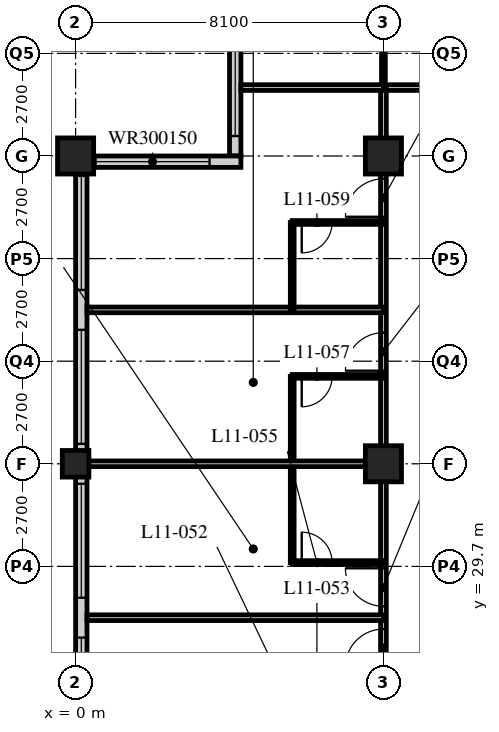
"""IFC4 building model, lengths in metres.
Left out: names, types, materials, properties, quantities, classifications, styles, units other than length and angle.
Written with IfcOpenShell. Run it as: python <this file> out.ifc"""

import sys

from ifc_helpers import new_model, si_unit, direction, frame, frame_2d, origin, origin_2d, place, context, subcontext, project, spatial, rectangle, hollow_rectangle, extrude, element, fill, save


model = new_model("IFC4")
c1 = context("Model", 3, precision=1e-05, world=origin(), true_north=direction((0.0, 1.0)))
c2 = subcontext(c1, "Body", "Model", "MODEL_VIEW")
j1 = project(units=[si_unit("LENGTHUNIT", "METRE"), si_unit("PLANEANGLEUNIT", "RADIAN")], contexts=[c1])
p1 = place(None, origin())
s1 = spatial("IfcSite", under=j1, at=p1, CompositionType="ELEMENT")
p2 = place(p1, origin())
s2 = spatial("IfcBuilding", under=s1, at=p2, CompositionType="ELEMENT")
p3 = place(p2, frame((0.0, 0.0, 50.0)))
s3 = spatial("IfcBuildingStorey", under=s2, at=p3, CompositionType="ELEMENT", Elevation=50.0)
p4 = place(p3, frame((0.0, 32.4, 0.0), z_axis=(0.0, 0.0, 1.0), x_axis=(1.0, 0.0, 0.0)))
e1 = element("IfcColumn", 1, at=p4, inside=s3, PredefinedType="COLUMN", context=c2, shape_type="SweptSolid", body=[
    extrude(hollow_rectangle(XDim=0.7, YDim=0.7, WallThickness=0.06, at=origin_2d()), origin(), (0.0, 0.0, 1.0), 3.4),
])
for number, where, z_axis, x_axis in (
    (2, (0.0, 40.5, 0.0), (0.0, 0.0, 1.0), (1.0, 0.0, 0.0)),
    (3, (8.1, 32.4, 0.0), (0.0, 0.0, 1.0), (1.0, 0.0, 0.0)),
    (4, (8.1, 40.5, 0.0), (0.0, 0.0, 1.0), (1.0, 0.0, 0.0)),
):
    element("IfcColumn", number, at=place(p3, frame(where, z_axis=z_axis, x_axis=x_axis)), inside=s3, PredefinedType="COLUMN", context=c2, shape_type="SweptSolid", body=[
        extrude(hollow_rectangle(XDim=0.95, YDim=0.95, WallThickness=0.095, at=origin_2d()), origin(), (0.0, 0.0, 1.0), 3.4),
    ])
p5 = place(p3, frame((4.2, 44.25, 0.0), z_axis=(0.0, 0.0, 1.0), x_axis=(0.0, -1.0, 0.0)))
e5 = element("IfcWall", 5, at=p5, inside=s3, PredefinedType="SOLIDWALL", context=c2, shape_type="SweptSolid", body=[
    extrude(rectangle(XDim=3.75, YDim=0.3, at=frame_2d((1.875, 0.0))), origin(), (0.0, 0.0, 1.0), 3.19),
])
p6 = place(p5, frame((0.225, 0.0, 0.9)))
e6 = element("IfcOpeningElement", 6, at=p6, cuts=e5, PredefinedType="OPENING", context=c2, shape_type="SweptSolid", body=[
    extrude(rectangle(XDim=3.0, YDim=1.5, at=frame_2d((1.5, 0.75))), frame((0.0, 0.16, 0.0), z_axis=(0.0, -1.0, 0.0), x_axis=(1.0, 0.0, 0.0)), (0.0, 0.0, 1.0), 0.32),
])
p7 = place(p3, frame((4.35, 40.35, 0.0), z_axis=(0.0, 0.0, 1.0), x_axis=(-1.0, 0.0, 0.0)))
e7 = element("IfcWall", 7, at=p7, inside=s3, PredefinedType="SOLIDWALL", context=c2, shape_type="SweptSolid", body=[
    extrude(rectangle(XDim=4.35, YDim=0.3, at=frame_2d((2.175, 0.0))), origin(), (0.0, 0.0, 1.0), 3.19),
])
p8 = place(p7, frame((0.825, 0.0, 0.9)))
e8 = element("IfcOpeningElement", 8, at=p8, cuts=e7, PredefinedType="OPENING", context=c2, shape_type="SweptSolid", body=[
    extrude(rectangle(XDim=3.0, YDim=1.5, at=frame_2d((1.5, 0.75))), frame((0.0, 0.16, 0.0), z_axis=(0.0, -1.0, 0.0), x_axis=(1.0, 0.0, 0.0)), (0.0, 0.0, 1.0), 0.32),
])
p9 = place(p3, frame((0.15, 40.2, 0.0), z_axis=(0.0, 0.0, 1.0), x_axis=(0.0, -1.0, 0.0)))
e9 = element("IfcWall", 9, at=p9, inside=s3, PredefinedType="SOLIDWALL", context=c2, shape_type="SweptSolid", body=[
    extrude(rectangle(XDim=32.1, YDim=0.3, at=frame_2d((16.05, 0.0))), origin(), (0.0, 0.0, 1.0), 3.19),
])
p10 = place(p9, frame((0.225, 0.0, 0.9)))
e10 = element("IfcOpeningElement", 10, at=p10, cuts=e9, PredefinedType="OPENING", context=c2, shape_type="SweptSolid", body=[
    extrude(rectangle(XDim=3.0, YDim=2.0, at=frame_2d((1.5, 1.0))), frame((0.0, 0.16, 0.0), z_axis=(0.0, -1.0, 0.0), x_axis=(1.0, 0.0, 0.0)), (0.0, 0.0, 1.0), 0.32),
])
p11 = place(p9, frame((4.275, 0.0, 0.9)))
e11 = element("IfcOpeningElement", 11, at=p11, cuts=e9, PredefinedType="OPENING", context=c2, shape_type="SweptSolid", body=[
    extrude(rectangle(XDim=3.0, YDim=2.0, at=frame_2d((1.5, 1.0))), frame((0.0, 0.16, 0.0), z_axis=(0.0, -1.0, 0.0), x_axis=(1.0, 0.0, 0.0)), (0.0, 0.0, 1.0), 0.32),
])
p12 = place(p9, frame((8.325, 0.0, 0.9)))
e12 = element("IfcOpeningElement", 12, at=p12, cuts=e9, PredefinedType="OPENING", context=c2, shape_type="SweptSolid", body=[
    extrude(rectangle(XDim=3.0, YDim=2.0, at=frame_2d((1.5, 1.0))), frame((0.0, 0.16, 0.0), z_axis=(0.0, -1.0, 0.0), x_axis=(1.0, 0.0, 0.0)), (0.0, 0.0, 1.0), 0.32),
])
p13 = place(p9, frame((12.375, 0.0, 0.9)))
e13 = element("IfcOpeningElement", 13, at=p13, cuts=e9, PredefinedType="OPENING", context=c2, shape_type="SweptSolid", body=[
    extrude(rectangle(XDim=3.0, YDim=2.0, at=frame_2d((1.5, 1.0))), frame((0.0, 0.16, 0.0), z_axis=(0.0, -1.0, 0.0), x_axis=(1.0, 0.0, 0.0)), (0.0, 0.0, 1.0), 0.32),
])
p14 = place(p9, frame((16.425, 0.0, 0.9)))
e14 = element("IfcOpeningElement", 14, at=p14, cuts=e9, PredefinedType="OPENING", context=c2, shape_type="SweptSolid", body=[
    extrude(rectangle(XDim=3.0, YDim=2.0, at=frame_2d((1.5, 1.0))), frame((0.0, 0.16, 0.0), z_axis=(0.0, -1.0, 0.0), x_axis=(1.0, 0.0, 0.0)), (0.0, 0.0, 1.0), 0.32),
])
p15 = place(p9, frame((20.475, 0.0, 0.9)))
e15 = element("IfcOpeningElement", 15, at=p15, cuts=e9, PredefinedType="OPENING", context=c2, shape_type="SweptSolid", body=[
    extrude(rectangle(XDim=3.0, YDim=2.0, at=frame_2d((1.5, 1.0))), frame((0.0, 0.16, 0.0), z_axis=(0.0, -1.0, 0.0), x_axis=(1.0, 0.0, 0.0)), (0.0, 0.0, 1.0), 0.32),
])
p16 = place(p9, frame((24.525, 0.0, 0.9)))
e16 = element("IfcOpeningElement", 16, at=p16, cuts=e9, PredefinedType="OPENING", context=c2, shape_type="SweptSolid", body=[
    extrude(rectangle(XDim=3.0, YDim=2.0, at=frame_2d((1.5, 1.0))), frame((0.0, 0.16, 0.0), z_axis=(0.0, -1.0, 0.0), x_axis=(1.0, 0.0, 0.0)), (0.0, 0.0, 1.0), 0.32),
])
p17 = place(p9, frame((28.575, 0.0, 0.9)))
e17 = element("IfcOpeningElement", 17, at=p17, cuts=e9, PredefinedType="OPENING", context=c2, shape_type="SweptSolid", body=[
    extrude(rectangle(XDim=3.0, YDim=2.0, at=frame_2d((1.5, 1.0))), frame((0.0, 0.16, 0.0), z_axis=(0.0, -1.0, 0.0), x_axis=(1.0, 0.0, 0.0)), (0.0, 0.0, 1.0), 0.32),
])
p18 = place(p3, frame((8.1, 42.3, 0.0), z_axis=(0.0, 0.0, 1.0), x_axis=(1.0, 0.0, 0.0)))
e18 = element("IfcWall", 18, at=p18, inside=s3, PredefinedType="PARTITIONING", context=c2, shape_type="SweptSolid", body=[
    extrude(rectangle(XDim=40.5, YDim=0.15, at=frame_2d((20.25, 0.0))), origin(), (0.0, 0.0, 1.0), 3.19),
])
p19 = place(p18, frame((6.5, 0.0, 0.0)))
e19 = element("IfcOpeningElement", 19, at=p19, cuts=e18, PredefinedType="OPENING", context=c2, shape_type="SweptSolid", body=[
    extrude(rectangle(XDim=1.0, YDim=2.1, at=frame_2d((0.5, 1.05))), frame((0.0, 0.085, 0.0), z_axis=(0.0, -1.0, 0.0), x_axis=(1.0, 0.0, 0.0)), (0.0, 0.0, 1.0), 0.17),
])
p20 = place(p18, frame((10.55, 0.0, 0.0)))
e20 = element("IfcOpeningElement", 20, at=p20, cuts=e18, PredefinedType="OPENING", context=c2, shape_type="SweptSolid", body=[
    extrude(rectangle(XDim=1.0, YDim=2.1, at=frame_2d((0.5, 1.05))), frame((0.0, 0.085, 0.0), z_axis=(0.0, -1.0, 0.0), x_axis=(1.0, 0.0, 0.0)), (0.0, 0.0, 1.0), 0.17),
])
p21 = place(p18, frame((14.6, 0.0, 0.0)))
e21 = element("IfcOpeningElement", 21, at=p21, cuts=e18, PredefinedType="OPENING", context=c2, shape_type="SweptSolid", body=[
    extrude(rectangle(XDim=1.0, YDim=2.1, at=frame_2d((0.5, 1.05))), frame((0.0, 0.085, 0.0), z_axis=(0.0, -1.0, 0.0), x_axis=(1.0, 0.0, 0.0)), (0.0, 0.0, 1.0), 0.17),
])
p22 = place(p18, frame((18.65, 0.0, 0.0)))
e22 = element("IfcOpeningElement", 22, at=p22, cuts=e18, PredefinedType="OPENING", context=c2, shape_type="SweptSolid", body=[
    extrude(rectangle(XDim=1.0, YDim=2.1, at=frame_2d((0.5, 1.05))), frame((0.0, 0.085, 0.0), z_axis=(0.0, -1.0, 0.0), x_axis=(1.0, 0.0, 0.0)), (0.0, 0.0, 1.0), 0.17),
])
p23 = place(p18, frame((22.7, 0.0, 0.0)))
e23 = element("IfcOpeningElement", 23, at=p23, cuts=e18, PredefinedType="OPENING", context=c2, shape_type="SweptSolid", body=[
    extrude(rectangle(XDim=1.0, YDim=2.1, at=frame_2d((0.5, 1.05))), frame((0.0, 0.085, 0.0), z_axis=(0.0, -1.0, 0.0), x_axis=(1.0, 0.0, 0.0)), (0.0, 0.0, 1.0), 0.17),
])
p24 = place(p18, frame((26.75, 0.0, 0.0)))
e24 = element("IfcOpeningElement", 24, at=p24, cuts=e18, PredefinedType="OPENING", context=c2, shape_type="SweptSolid", body=[
    extrude(rectangle(XDim=1.0, YDim=2.1, at=frame_2d((0.5, 1.05))), frame((0.0, 0.085, 0.0), z_axis=(0.0, -1.0, 0.0), x_axis=(1.0, 0.0, 0.0)), (0.0, 0.0, 1.0), 0.17),
])
p25 = place(p18, frame((30.8, 0.0, 0.0)))
e25 = element("IfcOpeningElement", 25, at=p25, cuts=e18, PredefinedType="OPENING", context=c2, shape_type="SweptSolid", body=[
    extrude(rectangle(XDim=1.0, YDim=2.1, at=frame_2d((0.5, 1.05))), frame((0.0, 0.085, 0.0), z_axis=(0.0, -1.0, 0.0), x_axis=(1.0, 0.0, 0.0)), (0.0, 0.0, 1.0), 0.17),
])
p26 = place(p18, frame((34.85, 0.0, 0.0)))
e26 = element("IfcOpeningElement", 26, at=p26, cuts=e18, PredefinedType="OPENING", context=c2, shape_type="SweptSolid", body=[
    extrude(rectangle(XDim=1.0, YDim=2.1, at=frame_2d((0.5, 1.05))), frame((0.0, 0.085, 0.0), z_axis=(0.0, -1.0, 0.0), x_axis=(1.0, 0.0, 0.0)), (0.0, 0.0, 1.0), 0.17),
])
p27 = place(p18, frame((36.875, 0.0, 0.0)))
e27 = element("IfcOpeningElement", 27, at=p27, cuts=e18, PredefinedType="OPENING", context=c2, shape_type="SweptSolid", body=[
    extrude(rectangle(XDim=1.0, YDim=2.1, at=frame_2d((0.5, 1.05))), frame((0.0, 0.085, 0.0), z_axis=(0.0, -1.0, 0.0), x_axis=(1.0, 0.0, 0.0)), (0.0, 0.0, 1.0), 0.17),
])
p28 = place(p18, frame((2.625, 0.0, 0.0)))
e28 = element("IfcOpeningElement", 28, at=p28, cuts=e18, PredefinedType="OPENING", context=c2, shape_type="SweptSolid", body=[
    extrude(rectangle(XDim=1.0, YDim=2.1, at=frame_2d((0.5, 1.05))), frame((0.0, 0.085, 0.0), z_axis=(0.0, -1.0, 0.0), x_axis=(1.0, 0.0, 0.0)), (0.0, 0.0, 1.0), 0.17),
])
p29 = place(p3, frame((8.1, 16.2, 0.0), z_axis=(0.0, 0.0, 1.0), x_axis=(0.0, 1.0, 0.0)))
e29 = element("IfcWall", 29, at=p29, inside=s3, PredefinedType="PARTITIONING", context=c2, shape_type="SweptSolid", body=[
    extrude(rectangle(XDim=26.1, YDim=0.15, at=frame_2d((13.05, 0.0))), origin(), (0.0, 0.0, 1.0), 2.578),
])
p30 = place(p29, frame((2.75, 0.0, 0.0)))
e30 = element("IfcOpeningElement", 30, at=p30, cuts=e29, PredefinedType="OPENING", context=c2, shape_type="SweptSolid", body=[
    extrude(rectangle(XDim=1.0, YDim=2.1, at=frame_2d((0.5, 1.05))), frame((0.0, 0.085, 0.0), z_axis=(0.0, -1.0, 0.0), x_axis=(1.0, 0.0, 0.0)), (0.0, 0.0, 1.0), 0.17),
])
p31 = place(p29, frame((4.35, 0.0, 0.0)))
e31 = element("IfcOpeningElement", 31, at=p31, cuts=e29, PredefinedType="OPENING", context=c2, shape_type="SweptSolid", body=[
    extrude(rectangle(XDim=1.0, YDim=2.1, at=frame_2d((0.5, 1.05))), frame((0.0, 0.085, 0.0), z_axis=(0.0, -1.0, 0.0), x_axis=(1.0, 0.0, 0.0)), (0.0, 0.0, 1.0), 0.17),
])
p32 = place(p29, frame((10.85, 0.0, 0.0)))
e32 = element("IfcOpeningElement", 32, at=p32, cuts=e29, PredefinedType="OPENING", context=c2, shape_type="SweptSolid", body=[
    extrude(rectangle(XDim=1.0, YDim=2.1, at=frame_2d((0.5, 1.05))), frame((0.0, 0.085, 0.0), z_axis=(0.0, -1.0, 0.0), x_axis=(1.0, 0.0, 0.0)), (0.0, 0.0, 1.0), 0.17),
])
p33 = place(p29, frame((12.45, 0.0, 0.0)))
e33 = element("IfcOpeningElement", 33, at=p33, cuts=e29, PredefinedType="OPENING", context=c2, shape_type="SweptSolid", body=[
    extrude(rectangle(XDim=1.0, YDim=2.1, at=frame_2d((0.5, 1.05))), frame((0.0, 0.085, 0.0), z_axis=(0.0, -1.0, 0.0), x_axis=(1.0, 0.0, 0.0)), (0.0, 0.0, 1.0), 0.17),
])
p34 = place(p29, frame((18.65, 0.0, 0.0)))
e34 = element("IfcOpeningElement", 34, at=p34, cuts=e29, PredefinedType="OPENING", context=c2, shape_type="SweptSolid", body=[
    extrude(rectangle(XDim=1.0, YDim=2.1, at=frame_2d((0.5, 1.05))), frame((0.0, 0.085, 0.0), z_axis=(0.0, -1.0, 0.0), x_axis=(1.0, 0.0, 0.0)), (0.0, 0.0, 1.0), 0.17),
])
p35 = place(p29, frame((22.7, 0.0, 0.0)))
e35 = element("IfcOpeningElement", 35, at=p35, cuts=e29, PredefinedType="OPENING", context=c2, shape_type="SweptSolid", body=[
    extrude(rectangle(XDim=1.0, YDim=2.1, at=frame_2d((0.5, 1.05))), frame((0.0, 0.085, 0.0), z_axis=(0.0, -1.0, 0.0), x_axis=(1.0, 0.0, 0.0)), (0.0, 0.0, 1.0), 0.17),
])
p36 = place(p3, frame((8.1, 28.35, 0.0), z_axis=(0.0, 0.0, 1.0), x_axis=(-1.0, 0.0, 0.0)))
e36 = element("IfcWall", 36, at=p36, inside=s3, PredefinedType="PARTITIONING", context=c2, shape_type="SweptSolid", body=[
    extrude(rectangle(XDim=7.8, YDim=0.15, at=frame_2d((3.9, 0.0))), origin(), (0.0, 0.0, 1.0), 3.19),
])
p37 = place(p3, frame((5.7, 29.8, 0.0), z_axis=(0.0, 0.0, 1.0), x_axis=(0.0, 1.0, 0.0)))
e37 = element("IfcWall", 37, at=p37, inside=s3, PredefinedType="PARTITIONING", context=c2, shape_type="SweptSolid", body=[
    extrude(rectangle(XDim=4.9, YDim=0.1, at=frame_2d((2.45, 0.0))), origin(), (0.0, 0.0, 1.0), 3.19),
])
p38 = place(p3, frame((8.1, 29.8, 0.0), z_axis=(0.0, 0.0, 1.0), x_axis=(-1.0, 0.0, 0.0)))
e38 = element("IfcWall", 38, at=p38, inside=s3, PredefinedType="PARTITIONING", context=c2, shape_type="SweptSolid", body=[
    extrude(rectangle(XDim=2.4, YDim=0.1, at=frame_2d((1.2, 0.0))), origin(), (0.0, 0.0, 1.0), 3.19),
])
p39 = place(p38, frame((1.35, 0.0, 0.0)))
e39 = element("IfcOpeningElement", 39, at=p39, cuts=e38, PredefinedType="OPENING", context=c2, shape_type="SweptSolid", body=[
    extrude(rectangle(XDim=0.8, YDim=2.1, at=frame_2d((0.4, 1.05))), frame((0.0, 0.06, 0.0), z_axis=(0.0, -1.0, 0.0), x_axis=(1.0, 0.0, 0.0)), (0.0, 0.0, 1.0), 0.12),
])
p40 = place(p3, frame((8.1, 32.4, 0.0), z_axis=(0.0, 0.0, 1.0), x_axis=(-1.0, 0.0, 0.0)))
e40 = element("IfcWall", 40, at=p40, inside=s3, PredefinedType="PARTITIONING", context=c2, shape_type="SweptSolid", body=[
    extrude(rectangle(XDim=7.8, YDim=0.15, at=frame_2d((3.9, 0.0))), origin(), (0.0, 0.0, 1.0), 2.578),
])
p41 = place(p3, frame((8.1, 34.7, 0.0), z_axis=(0.0, 0.0, 1.0), x_axis=(-1.0, 0.0, 0.0)))
e41 = element("IfcWall", 41, at=p41, inside=s3, PredefinedType="PARTITIONING", context=c2, shape_type="SweptSolid", body=[
    extrude(rectangle(XDim=2.4, YDim=0.1, at=frame_2d((1.2, 0.0))), origin(), (0.0, 0.0, 1.0), 3.19),
])
p42 = place(p41, frame((1.35, 0.0, 0.0)))
e42 = element("IfcOpeningElement", 42, at=p42, cuts=e41, PredefinedType="OPENING", context=c2, shape_type="SweptSolid", body=[
    extrude(rectangle(XDim=0.8, YDim=2.1, at=frame_2d((0.4, 1.05))), frame((0.0, 0.06, 0.0), z_axis=(0.0, -1.0, 0.0), x_axis=(1.0, 0.0, 0.0)), (0.0, 0.0, 1.0), 0.12),
])
p43 = place(p3, frame((8.1, 36.45, 0.0), z_axis=(0.0, 0.0, 1.0), x_axis=(-1.0, 0.0, 0.0)))
e43 = element("IfcWall", 43, at=p43, inside=s3, PredefinedType="PARTITIONING", context=c2, shape_type="SweptSolid", body=[
    extrude(rectangle(XDim=7.8, YDim=0.15, at=frame_2d((3.9, 0.0))), origin(), (0.0, 0.0, 1.0), 3.19),
])
p44 = place(p3, frame((5.7, 36.45, 0.0), z_axis=(0.0, 0.0, 1.0), x_axis=(0.0, 1.0, 0.0)))
e44 = element("IfcWall", 44, at=p44, inside=s3, PredefinedType="PARTITIONING", context=c2, shape_type="SweptSolid", body=[
    extrude(rectangle(XDim=2.3, YDim=0.1, at=frame_2d((1.15, 0.0))), origin(), (0.0, 0.0, 1.0), 3.19),
])
p45 = place(p3, frame((8.1, 38.75, 0.0), z_axis=(0.0, 0.0, 1.0), x_axis=(-1.0, 0.0, 0.0)))
e45 = element("IfcWall", 45, at=p45, inside=s3, PredefinedType="PARTITIONING", context=c2, shape_type="SweptSolid", body=[
    extrude(rectangle(XDim=2.4, YDim=0.1, at=frame_2d((1.2, 0.0))), origin(), (0.0, 0.0, 1.0), 3.19),
])
p46 = place(p45, frame((1.35, 0.0, 0.0)))
e46 = element("IfcOpeningElement", 46, at=p46, cuts=e45, PredefinedType="OPENING", context=c2, shape_type="SweptSolid", body=[
    extrude(rectangle(XDim=0.8, YDim=2.1, at=frame_2d((0.4, 1.05))), frame((0.0, 0.06, 0.0), z_axis=(0.0, -1.0, 0.0), x_axis=(1.0, 0.0, 0.0)), (0.0, 0.0, 1.0), 0.12),
])
p47 = place(p3, frame((8.1, 42.3, 0.0), z_axis=(0.0, 0.0, 1.0), x_axis=(0.0, 1.0, 0.0)))
e47 = element("IfcWall", 47, at=p47, inside=s3, PredefinedType="PARTITIONING", context=c2, shape_type="SweptSolid", body=[
    extrude(rectangle(XDim=2.25, YDim=0.1, at=frame_2d((1.125, 0.0))), origin(), (0.0, 0.0, 1.0), 2.578),
])
p48 = place(p3, frame((4.35, 42.3, 0.0), z_axis=(0.0, 0.0, 1.0), x_axis=(1.0, 0.0, 0.0)))
e48 = element("IfcWall", 48, at=p48, inside=s3, PredefinedType="PARTITIONING", context=c2, shape_type="SweptSolid", body=[
    extrude(rectangle(XDim=3.75, YDim=0.15, at=frame_2d((1.875, 0.0))), origin(), (0.0, 0.0, 1.0), 3.19),
])
p49 = place(p6, origin())
e49 = element("IfcWindow", 49, at=p49, inside=s3, PartitioningType="SINGLE_PANEL", PredefinedType="WINDOW", context=c2, shape_type="SweptSolid", body=[
    extrude(rectangle(XDim=3.0, YDim=1.5, at=frame_2d((1.5, 0.75))), frame((0.0, 0.03, 0.0), z_axis=(0.0, -1.0, 0.0), x_axis=(1.0, 0.0, 0.0)), (0.0, 0.0, 1.0), 0.06),
])
fill(e6, e49)
p50 = place(p8, origin())
e50 = element("IfcWindow", 50, at=p50, inside=s3, PartitioningType="SINGLE_PANEL", PredefinedType="WINDOW", context=c2, shape_type="SweptSolid", body=[
    extrude(rectangle(XDim=3.0, YDim=1.5, at=frame_2d((1.5, 0.75))), frame((0.0, 0.03, 0.0), z_axis=(0.0, -1.0, 0.0), x_axis=(1.0, 0.0, 0.0)), (0.0, 0.0, 1.0), 0.06),
])
fill(e8, e50)
p51 = place(p10, origin())
e51 = element("IfcWindow", 51, at=p51, inside=s3, PartitioningType="SINGLE_PANEL", PredefinedType="WINDOW", context=c2, shape_type="SweptSolid", body=[
    extrude(rectangle(XDim=3.0, YDim=2.0, at=frame_2d((1.5, 1.0))), frame((0.0, 0.03, 0.0), z_axis=(0.0, -1.0, 0.0), x_axis=(1.0, 0.0, 0.0)), (0.0, 0.0, 1.0), 0.06),
])
fill(e10, e51)
p52 = place(p11, origin())
e52 = element("IfcWindow", 52, at=p52, inside=s3, PartitioningType="SINGLE_PANEL", PredefinedType="WINDOW", context=c2, shape_type="SweptSolid", body=[
    extrude(rectangle(XDim=3.0, YDim=2.0, at=frame_2d((1.5, 1.0))), frame((0.0, 0.03, 0.0), z_axis=(0.0, -1.0, 0.0), x_axis=(1.0, 0.0, 0.0)), (0.0, 0.0, 1.0), 0.06),
])
fill(e11, e52)
p53 = place(p12, origin())
e53 = element("IfcWindow", 53, at=p53, inside=s3, PartitioningType="SINGLE_PANEL", PredefinedType="WINDOW", context=c2, shape_type="SweptSolid", body=[
    extrude(rectangle(XDim=3.0, YDim=2.0, at=frame_2d((1.5, 1.0))), frame((0.0, 0.03, 0.0), z_axis=(0.0, -1.0, 0.0), x_axis=(1.0, 0.0, 0.0)), (0.0, 0.0, 1.0), 0.06),
])
fill(e12, e53)
p54 = place(p13, origin())
e54 = element("IfcWindow", 54, at=p54, inside=s3, PartitioningType="SINGLE_PANEL", PredefinedType="WINDOW", context=c2, shape_type="SweptSolid", body=[
    extrude(rectangle(XDim=3.0, YDim=2.0, at=frame_2d((1.5, 1.0))), frame((0.0, 0.03, 0.0), z_axis=(0.0, -1.0, 0.0), x_axis=(1.0, 0.0, 0.0)), (0.0, 0.0, 1.0), 0.06),
])
fill(e13, e54)
p55 = place(p32, origin())
e55 = element("IfcDoor", 55, at=p55, inside=s3, OperationType="SINGLE_SWING_LEFT", PredefinedType="DOOR", context=c2, shape_type="SweptSolid", body=[
    extrude(rectangle(XDim=1.0, YDim=2.1, at=frame_2d((0.5, 1.05))), frame((0.0, 0.025, 0.0), z_axis=(0.0, -1.0, 0.0), x_axis=(1.0, 0.0, 0.0)), (0.0, 0.0, 1.0), 0.05),
])
fill(e32, e55)
p56 = place(p39, origin())
e56 = element("IfcDoor", 56, at=p56, inside=s3, OperationType="SINGLE_SWING_LEFT", PredefinedType="DOOR", context=c2, shape_type="SweptSolid", body=[
    extrude(rectangle(XDim=0.8, YDim=2.1, at=frame_2d((0.4, 1.05))), frame((0.0, 0.025, 0.0), z_axis=(0.0, -1.0, 0.0), x_axis=(1.0, 0.0, 0.0)), (0.0, 0.0, 1.0), 0.05),
])
fill(e39, e56)
p57 = place(p33, origin())
e57 = element("IfcDoor", 57, at=p57, inside=s3, OperationType="SINGLE_SWING_RIGHT", PredefinedType="DOOR", context=c2, shape_type="SweptSolid", body=[
    extrude(rectangle(XDim=1.0, YDim=2.1, at=frame_2d((0.5, 1.05))), frame((0.0, 0.025, 0.0), z_axis=(0.0, -1.0, 0.0), x_axis=(1.0, 0.0, 0.0)), (0.0, 0.0, 1.0), 0.05),
])
fill(e33, e57)
p58 = place(p42, origin())
e58 = element("IfcDoor", 58, at=p58, inside=s3, OperationType="SINGLE_SWING_RIGHT", PredefinedType="DOOR", context=c2, shape_type="SweptSolid", body=[
    extrude(rectangle(XDim=0.8, YDim=2.1, at=frame_2d((0.4, 1.05))), frame((0.0, 0.025, 0.0), z_axis=(0.0, -1.0, 0.0), x_axis=(1.0, 0.0, 0.0)), (0.0, 0.0, 1.0), 0.05),
])
fill(e42, e58)
p59 = place(p34, origin())
e59 = element("IfcDoor", 59, at=p59, inside=s3, OperationType="SINGLE_SWING_LEFT", PredefinedType="DOOR", context=c2, shape_type="SweptSolid", body=[
    extrude(rectangle(XDim=1.0, YDim=2.1, at=frame_2d((0.5, 1.05))), frame((0.0, 0.025, 0.0), z_axis=(0.0, -1.0, 0.0), x_axis=(1.0, 0.0, 0.0)), (0.0, 0.0, 1.0), 0.05),
])
fill(e34, e59)
p60 = place(p46, origin())
e60 = element("IfcDoor", 60, at=p60, inside=s3, OperationType="SINGLE_SWING_RIGHT", PredefinedType="DOOR", context=c2, shape_type="SweptSolid", body=[
    extrude(rectangle(XDim=0.8, YDim=2.1, at=frame_2d((0.4, 1.05))), frame((0.0, 0.025, 0.0), z_axis=(0.0, -1.0, 0.0), x_axis=(1.0, 0.0, 0.0)), (0.0, 0.0, 1.0), 0.05),
])
fill(e46, e60)
p61 = place(p35, origin())
e61 = element("IfcDoor", 61, at=p61, inside=s3, OperationType="SINGLE_SWING_LEFT", PredefinedType="DOOR", context=c2, shape_type="SweptSolid", body=[
    extrude(rectangle(XDim=1.0, YDim=2.1, at=frame_2d((0.5, 1.05))), frame((0.0, 0.025, 0.0), z_axis=(0.0, -1.0, 0.0), x_axis=(1.0, 0.0, 0.0)), (0.0, 0.0, 1.0), 0.05),
])
fill(e35, e61)
save(model, sys.argv[1])
